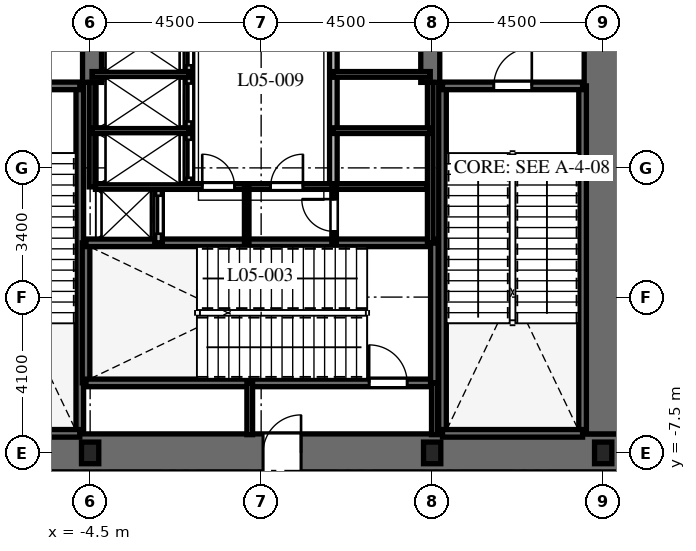
"""IFC4 building model, lengths in metres.
Left out: names, types, materials, properties, quantities, classifications, styles, units other than length and angle.
Written with IfcOpenShell. Run it as: python <this file> out.ifc"""

import sys

from ifc_helpers import new_model, si_unit, direction, frame, frame_2d, origin, origin_2d, place, context, subcontext, project, spatial, rectangle, i_section, extrude, element, fill, save


model = new_model("IFC4")
c1 = context("Model", 3, precision=1e-05, world=origin(), true_north=direction((0.0, 1.0)))
c2 = subcontext(c1, "Body", "Model", "MODEL_VIEW")
j1 = project(units=[si_unit("LENGTHUNIT", "METRE"), si_unit("PLANEANGLEUNIT", "RADIAN")], contexts=[c1])
p1 = place(None, origin())
s1 = spatial("IfcSite", under=j1, at=p1, CompositionType="ELEMENT")
p2 = place(p1, origin())
s2 = spatial("IfcBuilding", under=s1, at=p2, CompositionType="ELEMENT")
p3 = place(p2, frame((0.0, 0.0, 28.2)))
s3 = spatial("IfcBuildingStorey", under=s2, at=p3, CompositionType="ELEMENT", Elevation=28.2)
p4 = place(p3, frame((-9.5, -7.5, 0.0), z_axis=(0.0, 0.0, 1.0), x_axis=(1.0, 0.0, 0.0)))
e1 = element("IfcWall", 1, at=p4, inside=s3, PredefinedType="SHEAR", context=c2, shape_type="SweptSolid", body=[
    extrude(rectangle(XDim=19.0, YDim=1.0, at=frame_2d((9.5, 0.0))), origin(), (0.0, 0.0, 1.0), 6.0),
])
p5 = place(p4, frame((9.55, 0.0, 0.0)))
e2 = element("IfcOpeningElement", 2, at=p5, cuts=e1, PredefinedType="OPENING", context=c2, shape_type="SweptSolid", body=[
    extrude(rectangle(XDim=1.0, YDim=2.15, at=frame_2d((0.5, 1.075))), frame((0.0, 0.51, 0.0), z_axis=(0.0, -1.0, 0.0), x_axis=(1.0, 0.0, 0.0)), (0.0, 0.0, 1.0), 1.02),
])
p6 = place(p3, frame((9.0, -7.0, 0.0), z_axis=(0.0, 0.0, 1.0), x_axis=(0.0, 1.0, 0.0)))
e3 = element("IfcWall", 3, at=p6, inside=s3, PredefinedType="SHEAR", context=c2, shape_type="SweptSolid", body=[
    extrude(rectangle(XDim=14.0, YDim=1.0, at=frame_2d((7.0, 0.0))), origin(), (0.0, 0.0, 1.0), 6.0),
])
p7 = place(p6, frame((10.125, 0.0, 0.0)))
e4 = element("IfcOpeningElement", 4, at=p7, cuts=e3, PredefinedType="OPENING", context=c2, shape_type="SweptSolid", body=[
    extrude(rectangle(XDim=1.05, YDim=2.15, at=frame_2d((0.525, 1.075))), frame((0.0, 0.51, 0.0), z_axis=(0.0, -1.0, 0.0), x_axis=(1.0, 0.0, 0.0)), (0.0, 0.0, 1.0), 1.02),
])
for number, where, z_axis, x_axis in (
    (5, (-4.45, 2.25, 0.0), (0.0, 0.0, 1.0), (0.0, 1.0, 0.0)),
    (6, (4.45, 2.25, 0.0), (0.0, 0.0, 1.0), (0.0, 1.0, 0.0)),
):
    element("IfcWall", number, at=place(p3, frame(where, z_axis=z_axis, x_axis=x_axis)), inside=s3, PredefinedType="SHEAR", context=c2, shape_type="SweptSolid", body=[
        extrude(rectangle(XDim=4.75, YDim=0.5, at=frame_2d((2.375, 0.0))), origin(), (0.0, 0.0, 1.0), 6.0),
    ])
p8 = place(p3, frame((-4.772, -6.985, 0.0), z_axis=(0.0, 0.0, 1.0), x_axis=(0.0, 1.0, 0.0)))
e7 = element("IfcWall", 7, at=p8, inside=s3, PredefinedType="SHEAR", context=c2, shape_type="SweptSolid", body=[
    extrude(rectangle(XDim=9.143, YDim=0.2, at=frame_2d((4.572, 0.0))), origin(), (0.0, 0.0, 1.0), 6.0),
])
p9 = place(p3, frame((-8.458, -6.985, 0.0), z_axis=(0.0, 0.0, 1.0), x_axis=(1.0, 0.0, 0.0)))
e8 = element("IfcWall", 8, at=p9, inside=s3, PredefinedType="SHEAR", context=c2, shape_type="SweptSolid", body=[
    extrude(rectangle(XDim=3.686, YDim=0.2, at=frame_2d((1.843, 0.0))), origin(), (0.0, 0.0, 1.0), 6.0),
])
p10 = place(p3, frame((-8.458, 2.158, 0.0), z_axis=(0.0, 0.0, 1.0), x_axis=(1.0, 0.0, 0.0)))
e9 = element("IfcWall", 9, at=p10, inside=s3, PredefinedType="SHEAR", context=c2, shape_type="SweptSolid", body=[
    extrude(rectangle(XDim=3.686, YDim=0.2, at=frame_2d((1.843, 0.0))), origin(), (0.0, 0.0, 1.0), 6.0),
])
p11 = place(p10, frame((1.3, 0.0, 0.0)))
e10 = element("IfcOpeningElement", 10, at=p11, cuts=e9, PredefinedType="OPENING", context=c2, shape_type="SweptSolid", body=[
    extrude(rectangle(XDim=1.0, YDim=2.15, at=frame_2d((0.5, 1.075))), frame((0.0, 0.11, 0.0), z_axis=(0.0, -1.0, 0.0), x_axis=(1.0, 0.0, 0.0)), (0.0, 0.0, 1.0), 0.22),
])
for number, where, z_axis, x_axis in (
    (11, (4.772, -6.985, 0.0), (0.0, 0.0, 1.0), (0.0, 1.0, 0.0)),
    (12, (8.458, -6.985, 0.0), (0.0, 0.0, 1.0), (0.0, 1.0, 0.0)),
):
    element("IfcWall", number, at=place(p3, frame(where, z_axis=z_axis, x_axis=x_axis)), inside=s3, PredefinedType="SHEAR", context=c2, shape_type="SweptSolid", body=[
        extrude(rectangle(XDim=9.143, YDim=0.2, at=frame_2d((4.572, 0.0))), origin(), (0.0, 0.0, 1.0), 6.0),
    ])
p12 = place(p3, frame((4.772, -6.985, 0.0), z_axis=(0.0, 0.0, 1.0), x_axis=(1.0, 0.0, 0.0)))
e13 = element("IfcWall", 13, at=p12, inside=s3, PredefinedType="SHEAR", context=c2, shape_type="SweptSolid", body=[
    extrude(rectangle(XDim=3.686, YDim=0.2, at=frame_2d((1.843, 0.0))), origin(), (0.0, 0.0, 1.0), 6.0),
])
p13 = place(p3, frame((4.772, 2.158, 0.0), z_axis=(0.0, 0.0, 1.0), x_axis=(1.0, 0.0, 0.0)))
e14 = element("IfcWall", 14, at=p13, inside=s3, PredefinedType="SHEAR", context=c2, shape_type="SweptSolid", body=[
    extrude(rectangle(XDim=3.686, YDim=0.2, at=frame_2d((1.843, 0.0))), origin(), (0.0, 0.0, 1.0), 6.0),
])
p14 = place(p13, frame((1.35, 0.0, 0.0)))
e15 = element("IfcOpeningElement", 15, at=p14, cuts=e14, PredefinedType="OPENING", context=c2, shape_type="SweptSolid", body=[
    extrude(rectangle(XDim=1.0, YDim=2.15, at=frame_2d((0.5, 1.075))), frame((0.0, 0.11, 0.0), z_axis=(0.0, -1.0, 0.0), x_axis=(1.0, 0.0, 0.0)), (0.0, 0.0, 1.0), 0.22),
])
p15 = place(p3, frame((-4.608, -5.658, 0.0), z_axis=(0.0, 0.0, 1.0), x_axis=(0.0, 1.0, 0.0)))
e16 = element("IfcWall", 16, at=p15, inside=s3, PredefinedType="SHEAR", context=c2, shape_type="SweptSolid", body=[
    extrude(rectangle(XDim=3.686, YDim=0.2, at=frame_2d((1.843, 0.0))), origin(), (0.0, 0.0, 1.0), 6.0),
])
p16 = place(p3, frame((-4.608, -5.658, 0.0), z_axis=(0.0, 0.0, 1.0), x_axis=(1.0, 0.0, 0.0)))
e17 = element("IfcWall", 17, at=p16, inside=s3, PredefinedType="SHEAR", context=c2, shape_type="SweptSolid", body=[
    extrude(rectangle(XDim=9.166, YDim=0.2, at=frame_2d((4.583, 0.0))), origin(), (0.0, 0.0, 1.0), 6.0),
])
p17 = place(p16, frame((7.45, 0.0, 0.0)))
e18 = element("IfcOpeningElement", 18, at=p17, cuts=e17, PredefinedType="OPENING", context=c2, shape_type="SweptSolid", body=[
    extrude(rectangle(XDim=1.0, YDim=2.15, at=frame_2d((0.5, 1.075))), frame((0.0, 0.11, 0.0), z_axis=(0.0, -1.0, 0.0), x_axis=(1.0, 0.0, 0.0)), (0.0, 0.0, 1.0), 0.22),
])
p18 = place(p3, frame((-4.608, -1.972, 0.0), z_axis=(0.0, 0.0, 1.0), x_axis=(1.0, 0.0, 0.0)))
e19 = element("IfcWall", 19, at=p18, inside=s3, PredefinedType="SHEAR", context=c2, shape_type="SweptSolid", body=[
    extrude(rectangle(XDim=9.166, YDim=0.2, at=frame_2d((4.583, 0.0))), origin(), (0.0, 0.0, 1.0), 6.0),
])
p19 = place(p3, frame((4.558, -5.658, 0.0), z_axis=(0.0, 0.0, 1.0), x_axis=(0.0, 1.0, 0.0)))
e20 = element("IfcWall", 20, at=p19, inside=s3, PredefinedType="SHEAR", context=c2, shape_type="SweptSolid", body=[
    extrude(rectangle(XDim=3.686, YDim=0.2, at=frame_2d((1.843, 0.0))), origin(), (0.0, 0.0, 1.0), 6.0),
])
for number, where, z_axis, x_axis in (
    (21, (-4.5, -7.5, 0.0), (0.0, 0.0, 1.0), (1.0, 0.0, 0.0)),
    (22, (4.5, -7.5, 0.0), (0.0, 0.0, 1.0), (1.0, 0.0, 0.0)),
    (23, (9.0, -7.5, 0.0), (0.0, 0.0, 1.0), (1.0, 0.0, 0.0)),
):
    element("IfcColumn", number, at=place(p3, frame(where, z_axis=z_axis, x_axis=x_axis)), inside=s3, PredefinedType="COLUMN", context=c2, shape_type="SweptSolid", body=[
        extrude(i_section(OverallWidth=0.454, OverallDepth=0.569, WebThickness=0.078, FlangeThickness=0.125, at=origin_2d()), origin(), (0.0, 0.0, 1.0), 6.0),
    ])
for number, where, z_axis, x_axis in (
    (24, (-0.3, -7.02, 0.0), (0.0, 0.0, 1.0), (0.0, 1.0, 0.0)),
    (25, (4.558, -7.02, 0.0), (0.0, 0.0, 1.0), (0.0, 1.0, 0.0)),
):
    element("IfcWall", number, at=place(p3, frame(where, z_axis=z_axis, x_axis=x_axis)), inside=s3, PredefinedType="PARTITIONING", context=c2, shape_type="SweptSolid", body=[
        extrude(rectangle(XDim=1.362, YDim=0.15, at=frame_2d((0.681, 0.0))), origin(), (0.0, 0.0, 1.0), 5.7),
    ])
p20 = place(p3, frame((-2.7, -1.972, 0.0), z_axis=(0.0, 0.0, 1.0), x_axis=(0.0, 1.0, 0.0)))
e26 = element("IfcWall", 26, at=p20, inside=s3, PredefinedType="PARTITIONING", context=c2, shape_type="SweptSolid", body=[
    extrude(rectangle(XDim=1.472, YDim=0.2, at=frame_2d((0.736, 0.0))), origin(), (0.0, 0.0, 1.0), 5.7),
])
p21 = place(p20, frame((0.24, 0.0, 0.0)))
e27 = element("IfcOpeningElement", 27, at=p21, cuts=e26, PredefinedType="OPENING", context=c2, shape_type="SweptSolid", body=[
    extrude(rectangle(XDim=1.0, YDim=2.2, at=frame_2d((0.5, 1.1))), frame((0.0, 0.11, 0.0), z_axis=(0.0, -1.0, 0.0), x_axis=(1.0, 0.0, 0.0)), (0.0, 0.0, 1.0), 0.22),
])
p22 = place(p3, frame((-4.45, -0.5, 0.0), z_axis=(0.0, 0.0, 1.0), x_axis=(0.0, 1.0, 0.0)))
e28 = element("IfcWall", 28, at=p22, inside=s3, PredefinedType="PARTITIONING", context=c2, shape_type="SweptSolid", body=[
    extrude(rectangle(XDim=2.75, YDim=0.15, at=frame_2d((1.375, 0.0))), origin(), (0.0, 0.0, 1.0), 5.7),
])
p23 = place(p3, frame((4.45, -1.972, 0.0), z_axis=(0.0, 0.0, 1.0), x_axis=(0.0, 1.0, 0.0)))
e29 = element("IfcWall", 29, at=p23, inside=s3, PredefinedType="PARTITIONING", context=c2, shape_type="SweptSolid", body=[
    extrude(rectangle(XDim=4.222, YDim=0.15, at=frame_2d((2.111, 0.0))), origin(), (0.0, 0.0, 1.0), 5.7),
])
p24 = place(p3, frame((-1.9, -0.5, 0.0), z_axis=(0.0, 0.0, 1.0), x_axis=(0.0, 1.0, 0.0)))
e30 = element("IfcWall", 30, at=p24, inside=s3, PredefinedType="PARTITIONING", context=c2, shape_type="SweptSolid", body=[
    extrude(rectangle(XDim=4.44, YDim=0.2, at=frame_2d((2.22, 0.0))), origin(), (0.0, 0.0, 1.0), 5.7),
])
p25 = place(p24, frame((0.24, 0.0, 0.0)))
e31 = element("IfcOpeningElement", 31, at=p25, cuts=e30, PredefinedType="OPENING", context=c2, shape_type="SweptSolid", body=[
    extrude(rectangle(XDim=1.0, YDim=2.2, at=frame_2d((0.5, 1.1))), frame((0.0, 0.11, 0.0), z_axis=(0.0, -1.0, 0.0), x_axis=(1.0, 0.0, 0.0)), (0.0, 0.0, 1.0), 0.22),
])
p26 = place(p24, frame((1.72, 0.0, 0.0)))
e32 = element("IfcOpeningElement", 32, at=p26, cuts=e30, PredefinedType="OPENING", context=c2, shape_type="SweptSolid", body=[
    extrude(rectangle(XDim=1.0, YDim=2.2, at=frame_2d((0.5, 1.1))), frame((0.0, 0.11, 0.0), z_axis=(0.0, -1.0, 0.0), x_axis=(1.0, 0.0, 0.0)), (0.0, 0.0, 1.0), 0.22),
])
p27 = place(p24, frame((3.2, 0.0, 0.0)))
e33 = element("IfcOpeningElement", 33, at=p27, cuts=e30, PredefinedType="OPENING", context=c2, shape_type="SweptSolid", body=[
    extrude(rectangle(XDim=1.0, YDim=2.2, at=frame_2d((0.5, 1.1))), frame((0.0, 0.11, 0.0), z_axis=(0.0, -1.0, 0.0), x_axis=(1.0, 0.0, 0.0)), (0.0, 0.0, 1.0), 0.22),
])
for number, where, z_axis, x_axis in (
    (34, (-4.45, 0.98, 0.0), (0.0, 0.0, 1.0), (1.0, 0.0, 0.0)),
    (35, (-4.45, 2.46, 0.0), (0.0, 0.0, 1.0), (1.0, 0.0, 0.0)),
):
    element("IfcWall", number, at=place(p3, frame(where, z_axis=z_axis, x_axis=x_axis)), inside=s3, PredefinedType="PARTITIONING", context=c2, shape_type="SweptSolid", body=[
        extrude(rectangle(XDim=2.55, YDim=0.15, at=frame_2d((1.275, 0.0))), origin(), (0.0, 0.0, 1.0), 5.7),
    ])
p28 = place(p3, frame((1.9, -0.5, 0.0), z_axis=(0.0, 0.0, 1.0), x_axis=(0.0, 1.0, 0.0)))
e36 = element("IfcWall", 36, at=p28, inside=s3, PredefinedType="PARTITIONING", context=c2, shape_type="SweptSolid", body=[
    extrude(rectangle(XDim=4.44, YDim=0.2, at=frame_2d((2.22, 0.0))), origin(), (0.0, 0.0, 1.0), 5.7),
])
for number, where, z_axis, x_axis in (
    (37, (1.9, 0.98, 0.0), (0.0, 0.0, 1.0), (1.0, 0.0, 0.0)),
    (38, (1.9, 2.46, 0.0), (0.0, 0.0, 1.0), (1.0, 0.0, 0.0)),
):
    element("IfcWall", number, at=place(p3, frame(where, z_axis=z_axis, x_axis=x_axis)), inside=s3, PredefinedType="PARTITIONING", context=c2, shape_type="SweptSolid", body=[
        extrude(rectangle(XDim=2.55, YDim=0.15, at=frame_2d((1.275, 0.0))), origin(), (0.0, 0.0, 1.0), 5.7),
    ])
p29 = place(p3, frame((-4.36, -0.49, 0.0), z_axis=(0.0, 0.0, 1.0), x_axis=(1.0, 0.0, 0.0)))
e39 = element("IfcWall", 39, at=p29, inside=s3, PredefinedType="PARTITIONING", context=c2, shape_type="SweptSolid", body=[
    extrude(rectangle(XDim=8.72, YDim=0.15, at=frame_2d((4.36, 0.0))), origin(), (0.0, 0.0, 1.0), 5.7),
])
p30 = place(p29, frame((2.81, 0.0, 0.0)))
e40 = element("IfcOpeningElement", 40, at=p30, cuts=e39, PredefinedType="OPENING", context=c2, shape_type="SweptSolid", body=[
    extrude(rectangle(XDim=0.85, YDim=2.03, at=frame_2d((0.425, 1.015))), frame((0.0, 0.085, 0.0), z_axis=(0.0, -1.0, 0.0), x_axis=(1.0, 0.0, 0.0)), (0.0, 0.0, 1.0), 0.17),
])
p31 = place(p29, frame((4.61, 0.0, 0.0)))
e41 = element("IfcOpeningElement", 41, at=p31, cuts=e39, PredefinedType="OPENING", context=c2, shape_type="SweptSolid", body=[
    extrude(rectangle(XDim=0.85, YDim=2.03, at=frame_2d((0.425, 1.015))), frame((0.0, 0.085, 0.0), z_axis=(0.0, -1.0, 0.0), x_axis=(1.0, 0.0, 0.0)), (0.0, 0.0, 1.0), 0.17),
])
p32 = place(p3, frame((-0.38, -1.972, 0.0), z_axis=(0.0, 0.0, 1.0), x_axis=(0.0, 1.0, 0.0)))
e42 = element("IfcWall", 42, at=p32, inside=s3, PredefinedType="PARTITIONING", context=c2, shape_type="SweptSolid", body=[
    extrude(rectangle(XDim=1.472, YDim=0.12, at=frame_2d((0.736, 0.0))), origin(), (0.0, 0.0, 1.0), 5.7),
])
p33 = place(p3, frame((1.92, -1.972, 0.0), z_axis=(0.0, 0.0, 1.0), x_axis=(0.0, 1.0, 0.0)))
e43 = element("IfcWall", 43, at=p33, inside=s3, PredefinedType="PARTITIONING", context=c2, shape_type="SweptSolid", body=[
    extrude(rectangle(XDim=1.472, YDim=0.12, at=frame_2d((0.736, 0.0))), origin(), (0.0, 0.0, 1.0), 5.7),
])
p34 = place(p33, frame((0.3, 0.0, 0.0)))
e44 = element("IfcOpeningElement", 44, at=p34, cuts=e43, PredefinedType="OPENING", context=c2, shape_type="SweptSolid", body=[
    extrude(rectangle(XDim=0.85, YDim=2.03, at=frame_2d((0.425, 1.015))), frame((0.0, 0.07, 0.0), z_axis=(0.0, -1.0, 0.0), x_axis=(1.0, 0.0, 0.0)), (0.0, 0.0, 1.0), 0.14),
])
p35 = place(p14, origin())
e45 = element("IfcDoor", 45, at=p35, inside=s3, OperationType="SINGLE_SWING_RIGHT", PredefinedType="DOOR", context=c2, shape_type="SweptSolid", body=[
    extrude(rectangle(XDim=1.0, YDim=2.15, at=frame_2d((0.5, 1.075))), frame((0.0, 0.025, 0.0), z_axis=(0.0, -1.0, 0.0), x_axis=(1.0, 0.0, 0.0)), (0.0, 0.0, 1.0), 0.05),
])
fill(e15, e45)
p36 = place(p17, origin())
e46 = element("IfcDoor", 46, at=p36, inside=s3, OperationType="SINGLE_SWING_LEFT", PredefinedType="DOOR", context=c2, shape_type="SweptSolid", body=[
    extrude(rectangle(XDim=1.0, YDim=2.15, at=frame_2d((0.5, 1.075))), frame((0.0, 0.025, 0.0), z_axis=(0.0, -1.0, 0.0), x_axis=(1.0, 0.0, 0.0)), (0.0, 0.0, 1.0), 0.05),
])
fill(e18, e46)
p37 = place(p5, origin())
e47 = element("IfcDoor", 47, at=p37, inside=s3, OperationType="SINGLE_SWING_RIGHT", PredefinedType="DOOR", context=c2, shape_type="SweptSolid", body=[
    extrude(rectangle(XDim=1.0, YDim=2.15, at=frame_2d((0.5, 1.075))), frame((0.0, 0.025, 0.0), z_axis=(0.0, -1.0, 0.0), x_axis=(1.0, 0.0, 0.0)), (0.0, 0.0, 1.0), 0.05),
])
fill(e2, e47)
p38 = place(p21, origin())
e48 = element("IfcDoor", 48, at=p38, inside=s3, OperationType="SLIDING_TO_LEFT", PredefinedType="DOOR", context=c2, shape_type="SweptSolid", body=[
    extrude(rectangle(XDim=1.0, YDim=2.2, at=frame_2d((0.5, 1.1))), frame((0.0, 0.025, 0.0), z_axis=(0.0, -1.0, 0.0), x_axis=(1.0, 0.0, 0.0)), (0.0, 0.0, 1.0), 0.05),
])
fill(e27, e48)
p39 = place(p25, origin())
e49 = element("IfcDoor", 49, at=p39, inside=s3, OperationType="SLIDING_TO_LEFT", PredefinedType="DOOR", context=c2, shape_type="SweptSolid", body=[
    extrude(rectangle(XDim=1.0, YDim=2.2, at=frame_2d((0.5, 1.1))), frame((0.0, 0.025, 0.0), z_axis=(0.0, -1.0, 0.0), x_axis=(1.0, 0.0, 0.0)), (0.0, 0.0, 1.0), 0.05),
])
fill(e31, e49)
p40 = place(p26, origin())
e50 = element("IfcDoor", 50, at=p40, inside=s3, OperationType="SLIDING_TO_LEFT", PredefinedType="DOOR", context=c2, shape_type="SweptSolid", body=[
    extrude(rectangle(XDim=1.0, YDim=2.2, at=frame_2d((0.5, 1.1))), frame((0.0, 0.025, 0.0), z_axis=(0.0, -1.0, 0.0), x_axis=(1.0, 0.0, 0.0)), (0.0, 0.0, 1.0), 0.05),
])
fill(e32, e50)
p41 = place(p27, origin())
e51 = element("IfcDoor", 51, at=p41, inside=s3, OperationType="SLIDING_TO_LEFT", PredefinedType="DOOR", context=c2, shape_type="SweptSolid", body=[
    extrude(rectangle(XDim=1.0, YDim=2.2, at=frame_2d((0.5, 1.1))), frame((0.0, 0.025, 0.0), z_axis=(0.0, -1.0, 0.0), x_axis=(1.0, 0.0, 0.0)), (0.0, 0.0, 1.0), 0.05),
])
fill(e33, e51)
p42 = place(p30, origin())
e52 = element("IfcDoor", 52, at=p42, inside=s3, OperationType="SINGLE_SWING_LEFT", PredefinedType="DOOR", context=c2, shape_type="SweptSolid", body=[
    extrude(rectangle(XDim=0.85, YDim=2.03, at=frame_2d((0.425, 1.015))), frame((0.0, 0.025, 0.0), z_axis=(0.0, -1.0, 0.0), x_axis=(1.0, 0.0, 0.0)), (0.0, 0.0, 1.0), 0.05),
])
fill(e40, e52)
p43 = place(p31, origin())
e53 = element("IfcDoor", 53, at=p43, inside=s3, OperationType="SINGLE_SWING_RIGHT", PredefinedType="DOOR", context=c2, shape_type="SweptSolid", body=[
    extrude(rectangle(XDim=0.85, YDim=2.03, at=frame_2d((0.425, 1.015))), frame((0.0, 0.025, 0.0), z_axis=(0.0, -1.0, 0.0), x_axis=(1.0, 0.0, 0.0)), (0.0, 0.0, 1.0), 0.05),
])
fill(e41, e53)
p44 = place(p34, origin())
e54 = element("IfcDoor", 54, at=p44, inside=s3, OperationType="SINGLE_SWING_RIGHT", PredefinedType="DOOR", context=c2, shape_type="SweptSolid", body=[
    extrude(rectangle(XDim=0.85, YDim=2.03, at=frame_2d((0.425, 1.015))), frame((0.0, 0.025, 0.0), z_axis=(0.0, -1.0, 0.0), x_axis=(1.0, 0.0, 0.0)), (0.0, 0.0, 1.0), 0.05),
])
fill(e44, e54)
save(model, sys.argv[1])
